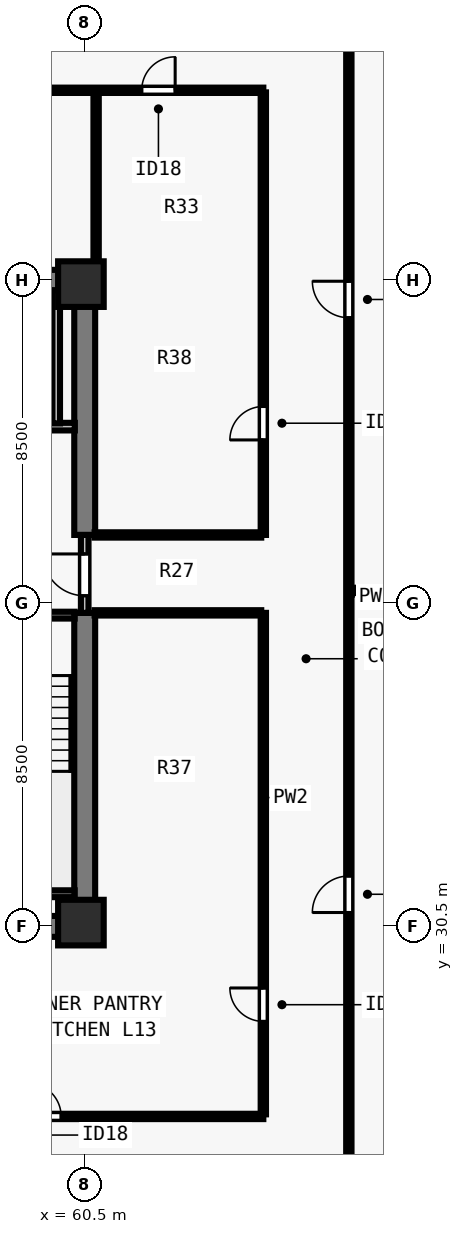
"""IFC4 building model, lengths in metres.
Left out: names, types, materials, properties, quantities, classifications, styles, units other than length and angle.
Written with IfcOpenShell. Run it as: python <this file> out.ifc"""

import sys

from ifc_helpers import new_model, si_unit, direction, frame, frame_2d, origin, origin_2d, place, context, subcontext, project, spatial, rectangle, extrude, element, fill, save


model = new_model("IFC4")
c1 = context("Model", 3, precision=1e-05, world=origin(), true_north=direction((0.0, 1.0)))
c2 = subcontext(c1, "Body", "Model", "MODEL_VIEW")
j1 = project(units=[si_unit("LENGTHUNIT", "METRE"), si_unit("PLANEANGLEUNIT", "RADIAN")], contexts=[c1])
p1 = place(None, origin())
s1 = spatial("IfcSite", under=j1, at=p1, CompositionType="ELEMENT")
p2 = place(p1, origin())
s2 = spatial("IfcBuilding", under=s1, at=p2, CompositionType="ELEMENT")
p3 = place(p2, frame((0.0, 0.0, 51.5)))
s3 = spatial("IfcBuildingStorey", under=s2, at=p3, CompositionType="ELEMENT", Elevation=51.5)
for number, where, z_axis, x_axis in (
    (1, (60.4, 30.6, 0.0), (0.0, 0.0, 1.0), (1.0, 0.0, 0.0)),
    (2, (60.4, 47.4, 0.0), (0.0, 0.0, 1.0), (1.0, 0.0, 0.0)),
):
    element("IfcColumn", number, at=place(p3, frame(where, z_axis=z_axis, x_axis=x_axis)), inside=s3, PredefinedType="COLUMN", context=c2, shape_type="SweptSolid", body=[
        extrude(rectangle(XDim=1.2, YDim=1.2, at=origin_2d()), origin(), (0.0, 0.0, 1.0), 3.5),
    ])
for number, where, z_axis, x_axis in (
    (3, (43.225, 30.5, 0.0), (0.0, 0.0, 1.0), (1.0, 0.0, 0.0)),
    (4, (43.225, 47.5, 0.0), (0.0, 0.0, 1.0), (1.0, 0.0, 0.0)),
):
    element("IfcWall", number, at=place(p3, frame(where, z_axis=z_axis, x_axis=x_axis)), inside=s3, PredefinedType="SHEAR", context=c2, shape_type="SweptSolid", body=[
        extrude(rectangle(XDim=17.55, YDim=0.55, at=frame_2d((8.775, 0.0))), origin(), (0.0, 0.0, 1.0), 3.28),
    ])
p4 = place(p3, frame((60.5, 30.765, 0.0), z_axis=(0.0, 0.0, 1.0), x_axis=(0.0, 1.0, 0.0)))
e5 = element("IfcWall", 5, at=p4, inside=s3, PredefinedType="SHEAR", context=c2, shape_type="SweptSolid", body=[
    extrude(rectangle(XDim=7.985, YDim=0.55, at=frame_2d((3.993, 0.0))), origin(), (0.0, 0.0, 1.0), 3.28),
])
p5 = place(p3, frame((60.5, 40.8, 0.0), z_axis=(0.0, 0.0, 1.0), x_axis=(0.0, 1.0, 0.0)))
e6 = element("IfcWall", 6, at=p5, inside=s3, PredefinedType="SHEAR", context=c2, shape_type="SweptSolid", body=[
    extrude(rectangle(XDim=6.435, YDim=0.55, at=frame_2d((3.218, 0.0))), origin(), (0.0, 0.0, 1.0), 3.28),
])
p6 = place(p3, frame((60.5, 38.75, 0.0), z_axis=(0.0, 0.0, 1.0), x_axis=(0.0, 1.0, 0.0)))
e7 = element("IfcWall", 7, at=p6, inside=s3, PredefinedType="SOLIDWALL", context=c2, shape_type="SweptSolid", body=[
    extrude(rectangle(XDim=2.05, YDim=0.2, at=frame_2d((1.025, 0.0))), origin(), (0.0, 0.0, 1.0), 3.28),
])
p7 = place(p6, frame((0.45, 0.0, 0.0)))
e8 = element("IfcOpeningElement", 8, at=p7, cuts=e7, PredefinedType="OPENING", context=c2, shape_type="SweptSolid", body=[
    extrude(rectangle(XDim=1.1, YDim=2.15, at=frame_2d((0.55, 1.075))), frame((0.0, 0.11, 0.0), z_axis=(0.0, -1.0, 0.0), x_axis=(1.0, 0.0, 0.0)), (0.0, 0.0, 1.0), 0.22),
])
p8 = place(p3, frame((56.735, 43.65, 0.0), z_axis=(0.0, 0.0, 1.0), x_axis=(1.0, 0.0, 0.0)))
e9 = element("IfcWall", 9, at=p8, inside=s3, PredefinedType="SOLIDWALL", context=c2, shape_type="SweptSolid", body=[
    extrude(rectangle(XDim=3.505, YDim=0.2, at=frame_2d((1.752, 0.0))), origin(), (0.0, 0.0, 1.0), 3.28),
])
p9 = place(p8, frame((1.295, 0.0, 0.0)))
e10 = element("IfcOpeningElement", 10, at=p9, cuts=e9, PredefinedType="OPENING", context=c2, shape_type="SweptSolid", body=[
    extrude(rectangle(XDim=1.1, YDim=2.2, at=frame_2d((0.55, 1.1))), frame((0.0, 0.11, 0.0), z_axis=(0.0, -1.0, 0.0), x_axis=(1.0, 0.0, 0.0)), (0.0, 0.0, 1.0), 0.22),
])
p10 = place(p3, frame((59.75, 43.735, 0.0), z_axis=(0.0, 0.0, 1.0), x_axis=(0.0, 1.0, 0.0)))
e11 = element("IfcWall", 11, at=p10, inside=s3, PredefinedType="SOLIDWALL", context=c2, shape_type="SweptSolid", body=[
    extrude(rectangle(XDim=3.505, YDim=0.2, at=frame_2d((1.752, 0.0))), origin(), (0.0, 0.0, 1.0), 3.28),
])
p11 = place(p3, frame((67.45, 23.305, 0.0), z_axis=(0.0, 0.0, 1.0), x_axis=(0.0, 1.0, 0.0)))
e12 = element("IfcWall", 12, at=p11, inside=s3, PredefinedType="PARTITIONING", context=c2, shape_type="SweptSolid", body=[
    extrude(rectangle(XDim=31.39, YDim=0.14, at=frame_2d((15.695, 0.0))), origin(), (0.0, 0.0, 1.0), 3.28),
])
p12 = place(p11, frame((7.561, 0.0, 0.0)))
e13 = element("IfcOpeningElement", 13, at=p12, cuts=e12, PredefinedType="OPENING", context=c2, shape_type="SweptSolid", body=[
    extrude(rectangle(XDim=0.96, YDim=2.12, at=frame_2d((0.48, 1.06))), frame((0.0, 0.08, 0.0), z_axis=(0.0, -1.0, 0.0), x_axis=(1.0, 0.0, 0.0)), (0.0, 0.0, 1.0), 0.16),
])
p13 = place(p11, frame((23.211, 0.0, 0.0)))
e14 = element("IfcOpeningElement", 14, at=p13, cuts=e12, PredefinedType="OPENING", context=c2, shape_type="SweptSolid", body=[
    extrude(rectangle(XDim=0.96, YDim=2.12, at=frame_2d((0.48, 1.06))), frame((0.0, 0.08, 0.0), z_axis=(0.0, -1.0, 0.0), x_axis=(1.0, 0.0, 0.0)), (0.0, 0.0, 1.0), 0.16),
])
p14 = place(p3, frame((38.8, 25.5, 0.0), z_axis=(0.0, 0.0, 1.0), x_axis=(1.0, 0.0, 0.0)))
e15 = element("IfcWall", 15, at=p14, inside=s3, PredefinedType="PARTITIONING", context=c2, shape_type="SweptSolid", body=[
    extrude(rectangle(XDim=26.4, YDim=0.14, at=frame_2d((13.2, 0.0))), origin(), (0.0, 0.0, 1.0), 3.28),
])
p15 = place(p14, frame((1.2, 0.0, 0.0)))
e16 = element("IfcOpeningElement", 16, at=p15, cuts=e15, PredefinedType="OPENING", context=c2, shape_type="SweptSolid", body=[
    extrude(rectangle(XDim=0.88, YDim=2.1, at=frame_2d((0.44, 1.05))), frame((0.0, 0.08, 0.0), z_axis=(0.0, -1.0, 0.0), x_axis=(1.0, 0.0, 0.0)), (0.0, 0.0, 1.0), 0.16),
])
p16 = place(p14, frame((9.7, 0.0, 0.0)))
e17 = element("IfcOpeningElement", 17, at=p16, cuts=e15, PredefinedType="OPENING", context=c2, shape_type="SweptSolid", body=[
    extrude(rectangle(XDim=0.88, YDim=2.1, at=frame_2d((0.44, 1.05))), frame((0.0, 0.08, 0.0), z_axis=(0.0, -1.0, 0.0), x_axis=(1.0, 0.0, 0.0)), (0.0, 0.0, 1.0), 0.16),
])
p17 = place(p14, frame((20.2, 0.0, 0.0)))
e18 = element("IfcOpeningElement", 18, at=p17, cuts=e15, PredefinedType="OPENING", context=c2, shape_type="SweptSolid", body=[
    extrude(rectangle(XDim=0.88, YDim=2.1, at=frame_2d((0.44, 1.05))), frame((0.0, 0.08, 0.0), z_axis=(0.0, -1.0, 0.0), x_axis=(1.0, 0.0, 0.0)), (0.0, 0.0, 1.0), 0.16),
])
p18 = place(p3, frame((38.8, 52.5, 0.0), z_axis=(0.0, 0.0, 1.0), x_axis=(1.0, 0.0, 0.0)))
e19 = element("IfcWall", 19, at=p18, inside=s3, PredefinedType="PARTITIONING", context=c2, shape_type="SweptSolid", body=[
    extrude(rectangle(XDim=26.4, YDim=0.14, at=frame_2d((13.2, 0.0))), origin(), (0.0, 0.0, 1.0), 3.28),
])
p19 = place(p18, frame((2.2, 0.0, 0.0)))
e20 = element("IfcOpeningElement", 20, at=p19, cuts=e19, PredefinedType="OPENING", context=c2, shape_type="SweptSolid", body=[
    extrude(rectangle(XDim=0.88, YDim=2.1, at=frame_2d((0.44, 1.05))), frame((0.0, 0.08, 0.0), z_axis=(0.0, -1.0, 0.0), x_axis=(1.0, 0.0, 0.0)), (0.0, 0.0, 1.0), 0.16),
])
p20 = place(p18, frame((13.7, 0.0, 0.0)))
e21 = element("IfcOpeningElement", 21, at=p20, cuts=e19, PredefinedType="OPENING", context=c2, shape_type="SweptSolid", body=[
    extrude(rectangle(XDim=0.88, YDim=2.1, at=frame_2d((0.44, 1.05))), frame((0.0, 0.08, 0.0), z_axis=(0.0, -1.0, 0.0), x_axis=(1.0, 0.0, 0.0)), (0.0, 0.0, 1.0), 0.16),
])
p21 = place(p18, frame((23.2, 0.0, 0.0)))
e22 = element("IfcOpeningElement", 22, at=p21, cuts=e19, PredefinedType="OPENING", context=c2, shape_type="SweptSolid", body=[
    extrude(rectangle(XDim=0.88, YDim=2.1, at=frame_2d((0.44, 1.05))), frame((0.0, 0.08, 0.0), z_axis=(0.0, -1.0, 0.0), x_axis=(1.0, 0.0, 0.0)), (0.0, 0.0, 1.0), 0.16),
])
p22 = place(p3, frame((65.2, 25.555, 0.0), z_axis=(0.0, 0.0, 1.0), x_axis=(0.0, 1.0, 0.0)))
e23 = element("IfcWall", 23, at=p22, inside=s3, PredefinedType="PARTITIONING", context=c2, shape_type="SweptSolid", body=[
    extrude(rectangle(XDim=13.195, YDim=0.14, at=frame_2d((6.598, 0.0))), origin(), (0.0, 0.0, 1.0), 3.28),
])
p23 = place(p22, frame((2.445, 0.0, 0.0)))
e24 = element("IfcOpeningElement", 24, at=p23, cuts=e23, PredefinedType="OPENING", context=c2, shape_type="SweptSolid", body=[
    extrude(rectangle(XDim=0.88, YDim=2.1, at=frame_2d((0.44, 1.05))), frame((0.0, 0.08, 0.0), z_axis=(0.0, -1.0, 0.0), x_axis=(1.0, 0.0, 0.0)), (0.0, 0.0, 1.0), 0.16),
])
p24 = place(p3, frame((65.2, 40.8, 0.0), z_axis=(0.0, 0.0, 1.0), x_axis=(0.0, 1.0, 0.0)))
e25 = element("IfcWall", 25, at=p24, inside=s3, PredefinedType="PARTITIONING", context=c2, shape_type="SweptSolid", body=[
    extrude(rectangle(XDim=11.645, YDim=0.14, at=frame_2d((5.823, 0.0))), origin(), (0.0, 0.0, 1.0), 3.28),
])
p25 = place(p24, frame((2.5, 0.0, 0.0)))
e26 = element("IfcOpeningElement", 26, at=p25, cuts=e25, PredefinedType="OPENING", context=c2, shape_type="SweptSolid", body=[
    extrude(rectangle(XDim=0.88, YDim=2.1, at=frame_2d((0.44, 1.05))), frame((0.0, 0.08, 0.0), z_axis=(0.0, -1.0, 0.0), x_axis=(1.0, 0.0, 0.0)), (0.0, 0.0, 1.0), 0.16),
])
for number, where, z_axis, x_axis in (
    (27, (60.76, 38.75, 0.0), (0.0, 0.0, 1.0), (1.0, 0.0, 0.0)),
    (28, (60.76, 40.8, 0.0), (0.0, 0.0, 1.0), (1.0, 0.0, 0.0)),
):
    element("IfcWall", number, at=place(p3, frame(where, z_axis=z_axis, x_axis=x_axis)), inside=s3, PredefinedType="PARTITIONING", context=c2, shape_type="SweptSolid", body=[
        extrude(rectangle(XDim=4.385, YDim=0.14, at=frame_2d((2.192, 0.0))), origin(), (0.0, 0.0, 1.0), 3.28),
    ])
p26 = place(p3, frame((60.8, 47.76, 0.0), z_axis=(0.0, 0.0, 1.0), x_axis=(0.0, 1.0, 0.0)))
e29 = element("IfcWall", 29, at=p26, inside=s3, PredefinedType="PARTITIONING", context=c2, shape_type="SweptSolid", body=[
    extrude(rectangle(XDim=4.685, YDim=0.14, at=frame_2d((2.343, 0.0))), origin(), (0.0, 0.0, 1.0), 2.439),
])
p27 = place(p3, frame((67.55, 39.341, 0.0), z_axis=(0.0, 0.0, 1.0), x_axis=(1.0, 0.0, 0.0)))
e30 = element("IfcWall", 30, at=p27, inside=s3, PredefinedType="PARTITIONING", context=c2, shape_type="SweptSolid", body=[
    extrude(rectangle(XDim=9.53, YDim=0.14, at=frame_2d((4.765, 0.0))), origin(), (0.0, 0.0, 1.0), 3.28),
])
p28 = place(p3, frame((57.005, 38.69, 0.0), z_axis=(0.0, 0.0, 1.0), x_axis=(1.0, 0.0, 0.0)))
e31 = element("IfcWall", 31, at=p28, inside=s3, PredefinedType="SOLIDWALL", context=c2, shape_type="SweptSolid", body=[
    extrude(rectangle(XDim=3.23, YDim=0.18, at=frame_2d((1.615, 0.0))), origin(), (0.0, 0.0, 1.0), 3.28),
])
p29 = place(p28, frame((1.14, 0.0, 0.0)))
e32 = element("IfcOpeningElement", 32, at=p29, cuts=e31, PredefinedType="OPENING", context=c2, shape_type="SweptSolid", body=[
    extrude(rectangle(XDim=0.95, YDim=2.15, at=frame_2d((0.475, 1.075))), frame((0.0, 0.1, 0.0), z_axis=(0.0, -1.0, 0.0), x_axis=(1.0, 0.0, 0.0)), (0.0, 0.0, 1.0), 0.2),
])
p30 = place(p3, frame((57.005, 31.36, 0.0), z_axis=(0.0, 0.0, 1.0), x_axis=(1.0, 0.0, 0.0)))
e33 = element("IfcWall", 33, at=p30, inside=s3, PredefinedType="SOLIDWALL", context=c2, shape_type="SweptSolid", body=[
    extrude(rectangle(XDim=3.23, YDim=0.18, at=frame_2d((1.615, 0.0))), origin(), (0.0, 0.0, 1.0), 3.28),
])
p31 = place(p7, origin())
e34 = element("IfcDoor", 34, at=p31, inside=s3, OperationType="SINGLE_SWING_RIGHT", PredefinedType="DOOR", context=c2, shape_type="SweptSolid", body=[
    extrude(rectangle(XDim=1.1, YDim=2.15, at=frame_2d((0.55, 1.075))), frame((0.0, 0.025, 0.0), z_axis=(0.0, -1.0, 0.0), x_axis=(1.0, 0.0, 0.0)), (0.0, 0.0, 1.0), 0.05),
])
fill(e8, e34)
p32 = place(p17, origin())
e35 = element("IfcDoor", 35, at=p32, inside=s3, OperationType="SINGLE_SWING_LEFT", PredefinedType="DOOR", context=c2, shape_type="SweptSolid", body=[
    extrude(rectangle(XDim=0.88, YDim=2.1, at=frame_2d((0.44, 1.05))), frame((0.0, 0.025, 0.0), z_axis=(0.0, -1.0, 0.0), x_axis=(1.0, 0.0, 0.0)), (0.0, 0.0, 1.0), 0.05),
])
fill(e18, e35)
p33 = place(p21, origin())
e36 = element("IfcDoor", 36, at=p33, inside=s3, OperationType="SINGLE_SWING_RIGHT", PredefinedType="DOOR", context=c2, shape_type="SweptSolid", body=[
    extrude(rectangle(XDim=0.88, YDim=2.1, at=frame_2d((0.44, 1.05))), frame((0.0, 0.025, 0.0), z_axis=(0.0, -1.0, 0.0), x_axis=(1.0, 0.0, 0.0)), (0.0, 0.0, 1.0), 0.05),
])
fill(e22, e36)
p34 = place(p23, origin())
e37 = element("IfcDoor", 37, at=p34, inside=s3, OperationType="SINGLE_SWING_RIGHT", PredefinedType="DOOR", context=c2, shape_type="SweptSolid", body=[
    extrude(rectangle(XDim=0.88, YDim=2.1, at=frame_2d((0.44, 1.05))), frame((0.0, 0.025, 0.0), z_axis=(0.0, -1.0, 0.0), x_axis=(1.0, 0.0, 0.0)), (0.0, 0.0, 1.0), 0.05),
])
fill(e24, e37)
p35 = place(p25, origin())
e38 = element("IfcDoor", 38, at=p35, inside=s3, OperationType="SINGLE_SWING_LEFT", PredefinedType="DOOR", context=c2, shape_type="SweptSolid", body=[
    extrude(rectangle(XDim=0.88, YDim=2.1, at=frame_2d((0.44, 1.05))), frame((0.0, 0.025, 0.0), z_axis=(0.0, -1.0, 0.0), x_axis=(1.0, 0.0, 0.0)), (0.0, 0.0, 1.0), 0.05),
])
fill(e26, e38)
p36 = place(p12, origin())
e39 = element("IfcDoor", 39, at=p36, inside=s3, OperationType="SINGLE_SWING_LEFT", PredefinedType="DOOR", context=c2, shape_type="SweptSolid", body=[
    extrude(rectangle(XDim=0.96, YDim=2.12, at=frame_2d((0.48, 1.06))), frame((0.0, 0.025, 0.0), z_axis=(0.0, -1.0, 0.0), x_axis=(1.0, 0.0, 0.0)), (0.0, 0.0, 1.0), 0.05),
])
fill(e13, e39)
p37 = place(p13, origin())
e40 = element("IfcDoor", 40, at=p37, inside=s3, OperationType="SINGLE_SWING_RIGHT", PredefinedType="DOOR", context=c2, shape_type="SweptSolid", body=[
    extrude(rectangle(XDim=0.96, YDim=2.12, at=frame_2d((0.48, 1.06))), frame((0.0, 0.025, 0.0), z_axis=(0.0, -1.0, 0.0), x_axis=(1.0, 0.0, 0.0)), (0.0, 0.0, 1.0), 0.05),
])
fill(e14, e40)
save(model, sys.argv[1])
